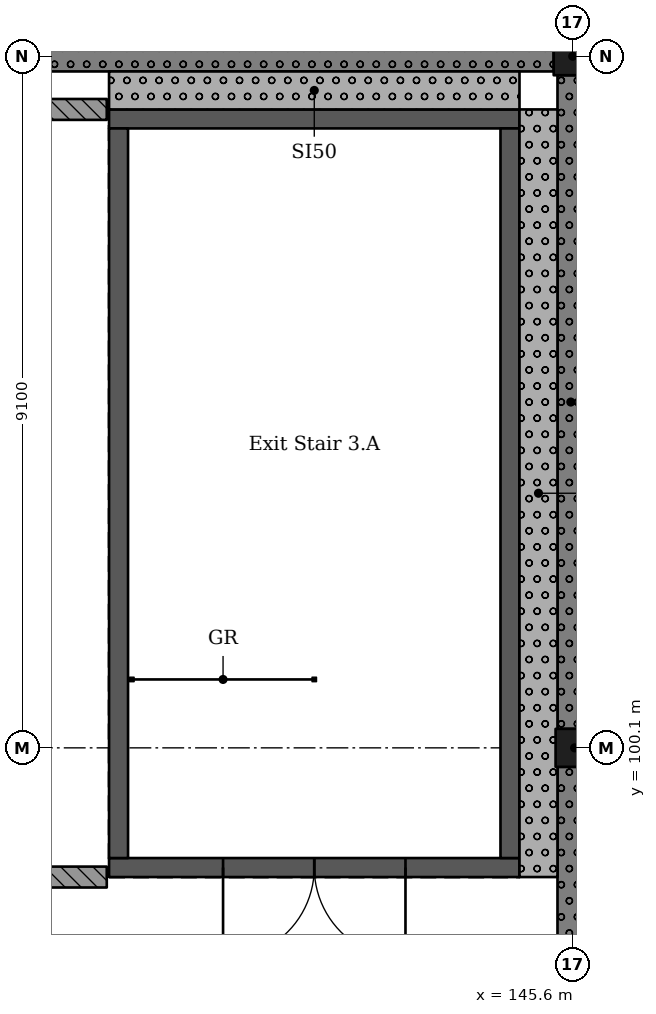
"""IFC4 building model, lengths in metres.
Left out: names, types, materials, properties, quantities, classifications, styles, units other than length and angle.
Written with IfcOpenShell. Run it as: python <this file> out.ifc"""

import sys

from ifc_helpers import new_model, si_unit, direction, frame, frame_2d, origin, origin_2d, place, context, subcontext, project, spatial, rectangle, extrude, element, fill, save


model = new_model("IFC4")
c1 = context("Model", 3, precision=1e-05, world=origin(), true_north=direction((0.0, 1.0)))
c2 = subcontext(c1, "Body", "Model", "MODEL_VIEW")
j1 = project(units=[si_unit("LENGTHUNIT", "METRE"), si_unit("PLANEANGLEUNIT", "RADIAN")], contexts=[c1])
p1 = place(None, origin())
s1 = spatial("IfcSite", under=j1, at=p1, CompositionType="ELEMENT")
p2 = place(p1, origin())
s2 = spatial("IfcBuilding", under=s1, at=p2, CompositionType="ELEMENT")
p3 = place(p2, frame((0.0, 0.0, 29.12)))
s3 = spatial("IfcBuildingStorey", under=s2, at=p3, CompositionType="ELEMENT", Elevation=29.12)
for number, where, z_axis, x_axis in (
    (1, (145.625, 100.1, 0.0), (0.0, 0.0, 1.0), (1.0, 0.0, 0.0)),
    (2, (145.6, 109.2, 0.0), (0.0, 0.0, 1.0), (1.0, 0.0, 0.0)),
):
    element("IfcColumn", number, at=place(p3, frame(where, z_axis=z_axis, x_axis=x_axis)), inside=s3, PredefinedType="COLUMN", context=c2, shape_type="SweptSolid", body=[
        extrude(rectangle(XDim=0.5, YDim=0.5, at=origin_2d()), origin(), (0.0, 0.0, 1.0), 4.55),
    ])
p4 = place(p3, frame((144.9, 98.525, 0.0), z_axis=(0.0, 0.0, 1.0), x_axis=(-1.0, 0.0, 0.0)))
e3 = element("IfcWall", 3, at=p4, inside=s3, PredefinedType="SHEAR", context=c2, shape_type="SweptSolid", body=[
    extrude(rectangle(XDim=5.4, YDim=0.25, at=frame_2d((2.7, 0.0))), origin(), (0.0, 0.0, 1.0), 4.55),
])
p5 = place(p4, frame((1.5, 0.0, 0.0)))
e4 = element("IfcOpeningElement", 4, at=p5, cuts=e3, PredefinedType="OPENING", context=c2, shape_type="SweptSolid", body=[
    extrude(rectangle(XDim=2.4, YDim=2.1, at=frame_2d((1.2, 1.05))), frame((0.0, 0.135, 0.0), z_axis=(0.0, -1.0, 0.0), x_axis=(1.0, 0.0, 0.0)), (0.0, 0.0, 1.0), 0.27),
])
p6 = place(p3, frame((144.9, 108.375, 0.0), z_axis=(0.0, 0.0, 1.0), x_axis=(-1.0, 0.0, 0.0)))
e5 = element("IfcWall", 5, at=p6, inside=s3, PredefinedType="SHEAR", context=c2, shape_type="SweptSolid", body=[
    extrude(rectangle(XDim=5.4, YDim=0.25, at=frame_2d((2.7, 0.0))), origin(), (0.0, 0.0, 1.0), 4.55),
])
for number, where, z_axis, x_axis in (
    (6, (139.625, 108.25, 0.0), (0.0, 0.0, 1.0), (0.0, -1.0, 0.0)),
    (7, (144.775, 108.25, 0.0), (0.0, 0.0, 1.0), (0.0, -1.0, 0.0)),
):
    element("IfcWall", number, at=place(p3, frame(where, z_axis=z_axis, x_axis=x_axis)), inside=s3, PredefinedType="SHEAR", context=c2, shape_type="SweptSolid", body=[
        extrude(rectangle(XDim=9.6, YDim=0.25, at=frame_2d((4.8, 0.0))), origin(), (0.0, 0.0, 1.0), 4.55),
    ])
p7 = place(p3, frame((145.575, 91.25, 0.0), z_axis=(0.0, 0.0, 1.0), x_axis=(0.0, 1.0, 0.0)))
e8 = element("IfcWall", 8, at=p7, inside=s3, PredefinedType="SOLIDWALL", context=c2, shape_type="SweptSolid", body=[
    extrude(rectangle(XDim=8.6, YDim=0.35, at=frame_2d((4.3, 0.0))), origin(), (0.0, 0.0, 1.0), 4.5),
])
p8 = place(p3, frame((145.575, 100.35, 0.0), z_axis=(0.0, 0.0, 1.0), x_axis=(0.0, 1.0, 0.0)))
e9 = element("IfcWall", 9, at=p8, inside=s3, PredefinedType="SOLIDWALL", context=c2, shape_type="SweptSolid", body=[
    extrude(rectangle(XDim=8.6, YDim=0.35, at=frame_2d((4.3, 0.0))), origin(), (0.0, 0.0, 1.0), 4.5),
])
p9 = place(p3, frame((145.35, 109.175, 0.0), z_axis=(0.0, 0.0, 1.0), x_axis=(-1.0, 0.0, 0.0)))
e10 = element("IfcWall", 10, at=p9, inside=s3, PredefinedType="SOLIDWALL", context=c2, shape_type="SweptSolid", body=[
    extrude(rectangle(XDim=8.6, YDim=0.35, at=frame_2d((4.3, 0.0))), origin(), (0.0, 0.0, 1.0), 4.5),
])
p10 = place(p3, frame((139.5, 108.75, 0.0), z_axis=(0.0, 0.0, 1.0), x_axis=(1.0, 0.0, 0.0)))
e11 = element("IfcWall", 11, at=p10, inside=s3, PredefinedType="SOLIDWALL", context=c2, shape_type="SweptSolid", body=[
    extrude(rectangle(XDim=5.4, YDim=0.5, at=frame_2d((2.7, 0.0))), origin(), (0.0, 0.0, 1.0), 3.88),
])
p11 = place(p3, frame((145.15, 98.4, 0.0), z_axis=(0.0, 0.0, 1.0), x_axis=(0.0, 1.0, 0.0)))
e12 = element("IfcWall", 12, at=p11, inside=s3, PredefinedType="SOLIDWALL", context=c2, shape_type="SweptSolid", body=[
    extrude(rectangle(XDim=10.1, YDim=0.5, at=frame_2d((5.05, 0.0))), origin(), (0.0, 0.0, 1.0), 4.55),
])
p12 = place(p3, frame((135.83, 98.4, 0.0), z_axis=(0.0, 0.0, 1.0), x_axis=(1.0, 0.0, 0.0)))
e13 = element("IfcWall", 13, at=p12, inside=s3, PredefinedType="SOLIDWALL", context=c2, shape_type="SweptSolid", body=[
    extrude(rectangle(XDim=3.64, YDim=0.275, at=frame_2d((1.82, 0.0))), origin(), (0.0, 0.0, 1.0), 3.88),
])
p13 = place(p12, frame((1.25, 0.0, 0.0)))
e14 = element("IfcOpeningElement", 14, at=p13, cuts=e13, PredefinedType="OPENING", context=c2, shape_type="SweptSolid", body=[
    extrude(rectangle(XDim=1.2, YDim=2.4, at=frame_2d((0.6, 1.2))), frame((0.0, 0.147, 0.0), z_axis=(0.0, -1.0, 0.0), x_axis=(1.0, 0.0, 0.0)), (0.0, 0.0, 1.0), 0.295),
])
p14 = place(p3, frame((135.83, 108.5, 0.0), z_axis=(0.0, 0.0, 1.0), x_axis=(1.0, 0.0, 0.0)))
e15 = element("IfcWall", 15, at=p14, inside=s3, PredefinedType="SOLIDWALL", context=c2, shape_type="SweptSolid", body=[
    extrude(rectangle(XDim=3.64, YDim=0.275, at=frame_2d((1.82, 0.0))), origin(), (0.0, 0.0, 1.0), 3.88),
])
p15 = place(p5, origin())
e16 = element("IfcDoor", 16, at=p15, inside=s3, OperationType="DOUBLE_DOOR_SINGLE_SWING", PredefinedType="DOOR", context=c2, shape_type="SweptSolid", body=[
    extrude(rectangle(XDim=2.4, YDim=2.1, at=frame_2d((1.2, 1.05))), frame((0.0, 0.025, 0.0), z_axis=(0.0, -1.0, 0.0), x_axis=(1.0, 0.0, 0.0)), (0.0, 0.0, 1.0), 0.05),
])
fill(e4, e16)
save(model, sys.argv[1])
